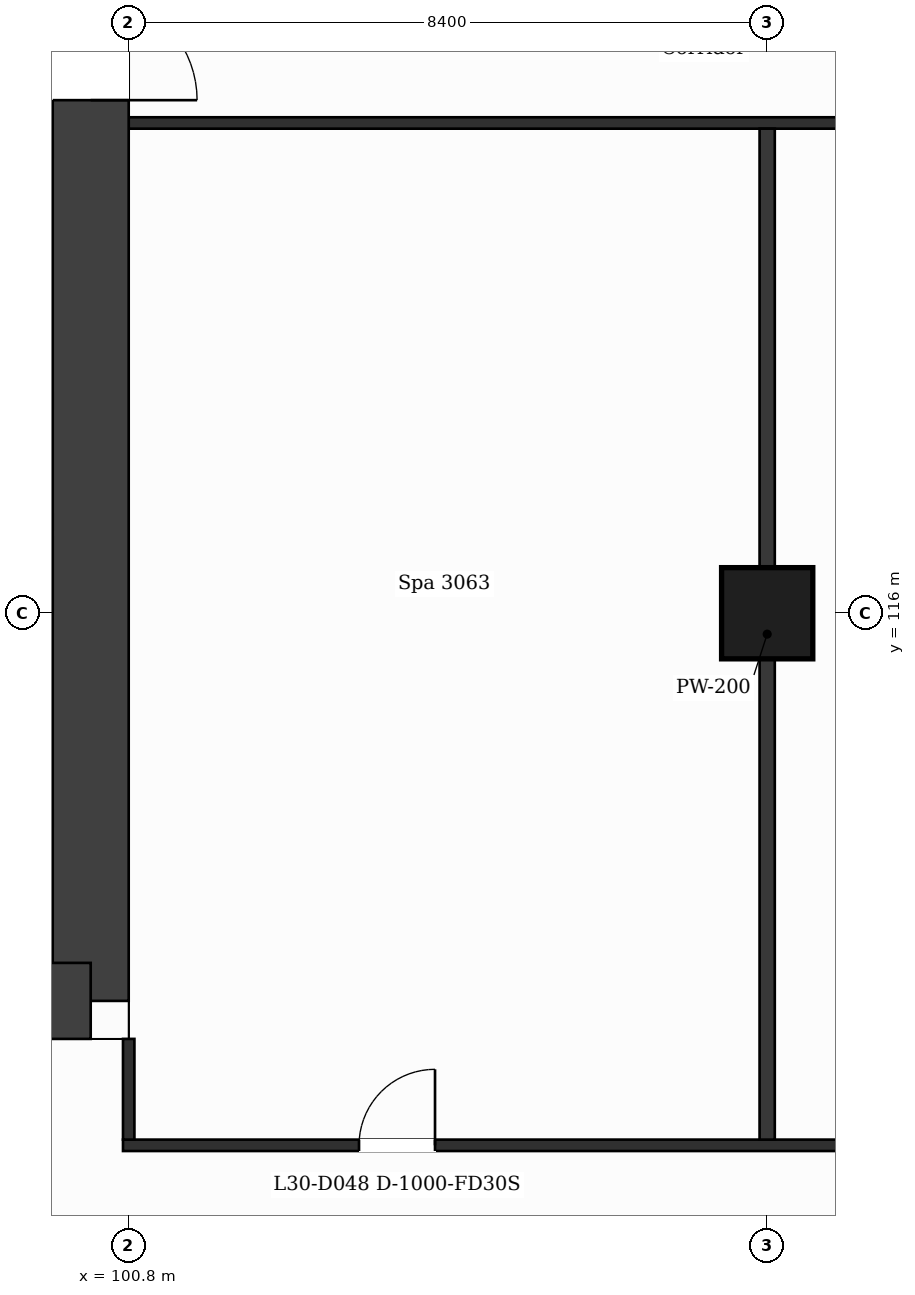
"""IFC4 building model, lengths in metres.
Left out: names, types, materials, properties, quantities, classifications, styles, units other than length and angle.
Written with IfcOpenShell. Run it as: python <this file> out.ifc"""

import sys

from ifc_helpers import new_model, si_unit, direction, frame, frame_2d, origin, origin_2d, place, context, subcontext, project, spatial, rectangle, extrude, element, fill, save


model = new_model("IFC4")
c1 = context("Model", 3, precision=1e-05, world=origin(), true_north=direction((0.0, 1.0)))
c2 = subcontext(c1, "Body", "Model", "MODEL_VIEW")
j1 = project(units=[si_unit("LENGTHUNIT", "METRE"), si_unit("PLANEANGLEUNIT", "RADIAN")], contexts=[c1])
p1 = place(None, origin())
s1 = spatial("IfcSite", under=j1, at=p1, CompositionType="ELEMENT")
p2 = place(p1, origin())
s2 = spatial("IfcBuilding", under=s1, at=p2, CompositionType="ELEMENT")
p3 = place(p2, frame((0.0, 0.0, 128.0)))
s3 = spatial("IfcBuildingStorey", under=s2, at=p3, CompositionType="ELEMENT", Elevation=128.0)
p4 = place(p3, frame((100.3, 131.9, 0.0), z_axis=(0.0, 0.0, 1.0), x_axis=(0.0, -1.0, 0.0)))
e1 = element("IfcWall", 1, at=p4, inside=s3, PredefinedType="SHEAR", context=c2, shape_type="SweptSolid", body=[
    extrude(rectangle(XDim=21.0, YDim=1.0, at=frame_2d((10.5, 0.0))), origin(), (0.0, 0.0, 1.0), 3.7),
])
p5 = place(p4, frame((7.75, 0.0, 0.0)))
e2 = element("IfcOpeningElement", 2, at=p5, cuts=e1, PredefinedType="OPENING", context=c2, shape_type="SweptSolid", body=[
    extrude(rectangle(XDim=1.4, YDim=2.1, at=frame_2d((0.7, 1.05))), frame((0.0, 0.51, 0.0), z_axis=(0.0, -1.0, 0.0), x_axis=(1.0, 0.0, 0.0)), (0.0, 0.0, 1.0), 1.02),
])
p6 = place(p3, frame((100.3, 110.9, 0.0), z_axis=(0.0, 0.0, 1.0), x_axis=(-1.0, 0.0, 0.0)))
e3 = element("IfcWall", 3, at=p6, inside=s3, PredefinedType="SHEAR", context=c2, shape_type="SweptSolid", body=[
    extrude(rectangle(XDim=14.059, YDim=1.0, at=frame_2d((7.03, 0.0))), origin(), (0.0, 0.0, 1.0), 3.7),
])
p7 = place(p6, frame((5.802, 0.0, 0.0)))
e4 = element("IfcOpeningElement", 4, at=p7, cuts=e3, PredefinedType="OPENING", context=c2, shape_type="SweptSolid", body=[
    extrude(rectangle(XDim=1.4, YDim=2.1, at=frame_2d((0.7, 1.05))), frame((0.0, 0.51, 0.0), z_axis=(0.0, -1.0, 0.0), x_axis=(1.0, 0.0, 0.0)), (0.0, 0.0, 1.0), 1.02),
])
p8 = place(p3, frame((94.9, 116.5, 0.0), z_axis=(0.0, 0.0, 1.0), x_axis=(1.0, 0.0, 0.0)))
e5 = element("IfcWall", 5, at=p8, inside=s3, PredefinedType="SHEAR", context=c2, shape_type="SweptSolid", body=[
    extrude(rectangle(XDim=4.9, YDim=1.0, at=frame_2d((2.45, 0.0))), origin(), (0.0, 0.0, 1.0), 3.7),
])
p9 = place(p3, frame((109.2, 116.0, 0.0), z_axis=(0.0, 0.0, 1.0), x_axis=(1.0, 0.0, 0.0)))
e6 = element("IfcColumn", 6, at=p9, inside=s3, PredefinedType="COLUMN", context=c2, shape_type="SweptSolid", body=[
    extrude(rectangle(XDim=1.2, YDim=1.2, at=origin_2d()), origin(), (0.0, 0.0, 1.0), 3.7),
])
p10 = place(p3, frame((100.725, 109.0, 0.0), z_axis=(0.0, 0.0, 1.0), x_axis=(1.0, 0.0, 0.0)))
e7 = element("IfcWall", 7, at=p10, inside=s3, PredefinedType="PARTITIONING", context=c2, shape_type="SweptSolid", body=[
    extrude(rectangle(XDim=25.35, YDim=0.15, at=frame_2d((12.675, 0.0))), origin(), (0.0, 0.0, 1.0), 3.38),
])
p11 = place(p10, frame((3.105, 0.0, 0.0)))
e8 = element("IfcOpeningElement", 8, at=p11, cuts=e7, PredefinedType="OPENING", context=c2, shape_type="SweptSolid", body=[
    extrude(rectangle(XDim=1.0, YDim=2.1, at=frame_2d((0.5, 1.05))), frame((0.0, 0.085, 0.0), z_axis=(0.0, -1.0, 0.0), x_axis=(1.0, 0.0, 0.0)), (0.0, 0.0, 1.0), 0.17),
])
p12 = place(p10, frame((13.85, 0.0, 0.0)))
e9 = element("IfcOpeningElement", 9, at=p12, cuts=e7, PredefinedType="OPENING", context=c2, shape_type="SweptSolid", body=[
    extrude(rectangle(XDim=1.0, YDim=2.1, at=frame_2d((0.5, 1.05))), frame((0.0, 0.085, 0.0), z_axis=(0.0, -1.0, 0.0), x_axis=(1.0, 0.0, 0.0)), (0.0, 0.0, 1.0), 0.17),
])
p13 = place(p10, frame((18.475, 0.0, 0.0)))
e10 = element("IfcOpeningElement", 10, at=p13, cuts=e7, PredefinedType="OPENING", context=c2, shape_type="SweptSolid", body=[
    extrude(rectangle(XDim=1.0, YDim=2.1, at=frame_2d((0.5, 1.05))), frame((0.0, 0.085, 0.0), z_axis=(0.0, -1.0, 0.0), x_axis=(1.0, 0.0, 0.0)), (0.0, 0.0, 1.0), 0.17),
])
p14 = place(p10, frame((22.925, 0.0, 0.0)))
e11 = element("IfcOpeningElement", 11, at=p14, cuts=e7, PredefinedType="OPENING", context=c2, shape_type="SweptSolid", body=[
    extrude(rectangle(XDim=1.0, YDim=2.1, at=frame_2d((0.5, 1.05))), frame((0.0, 0.085, 0.0), z_axis=(0.0, -1.0, 0.0), x_axis=(1.0, 0.0, 0.0)), (0.0, 0.0, 1.0), 0.17),
])
for number, where, z_axis, x_axis in (
    (12, (95.227, 117.2, 0.0), (0.0, 0.0, 1.0), (1.0, 0.0, 0.0)),
    (13, (95.227, 118.8, 0.0), (0.0, 0.0, 1.0), (1.0, 0.0, 0.0)),
):
    element("IfcWall", number, at=place(p3, frame(where, z_axis=z_axis, x_axis=x_axis)), inside=s3, PredefinedType="PARTITIONING", context=c2, shape_type="SweptSolid", body=[
        extrude(rectangle(XDim=4.573, YDim=0.2, at=frame_2d((2.287, 0.0))), origin(), (0.0, 0.0, 1.0), 3.38),
    ])
p15 = place(p3, frame((95.227, 122.1, 0.0), z_axis=(0.0, 0.0, 1.0), x_axis=(1.0, 0.0, 0.0)))
e14 = element("IfcWall", 14, at=p15, inside=s3, PredefinedType="PARTITIONING", context=c2, shape_type="SweptSolid", body=[
    extrude(rectangle(XDim=4.573, YDim=0.2, at=frame_2d((2.287, 0.0))), origin(), (0.0, 0.0, 1.0), 3.38),
])
p16 = place(p15, frame((0.865, 0.0, 0.0)))
e15 = element("IfcOpeningElement", 15, at=p16, cuts=e14, PredefinedType="OPENING", context=c2, shape_type="SweptSolid", body=[
    extrude(rectangle(XDim=0.9, YDim=2.1, at=frame_2d((0.45, 1.05))), frame((0.0, 0.11, 0.0), z_axis=(0.0, -1.0, 0.0), x_axis=(1.0, 0.0, 0.0)), (0.0, 0.0, 1.0), 0.22),
])
p17 = place(p15, frame((2.911, 0.0, 0.0)))
e16 = element("IfcOpeningElement", 16, at=p17, cuts=e14, PredefinedType="OPENING", context=c2, shape_type="SweptSolid", body=[
    extrude(rectangle(XDim=0.9, YDim=2.1, at=frame_2d((0.45, 1.05))), frame((0.0, 0.11, 0.0), z_axis=(0.0, -1.0, 0.0), x_axis=(1.0, 0.0, 0.0)), (0.0, 0.0, 1.0), 0.22),
])
p18 = place(p3, frame((100.8, 122.45, 0.0), z_axis=(0.0, 0.0, 1.0), x_axis=(1.0, 0.0, 0.0)))
e17 = element("IfcWall", 17, at=p18, inside=s3, PredefinedType="PARTITIONING", context=c2, shape_type="SweptSolid", body=[
    extrude(rectangle(XDim=25.2, YDim=0.15, at=frame_2d((12.6, 0.0))), origin(), (0.0, 0.0, 1.0), 3.38),
])
p19 = place(p3, frame((100.8, 109.075, 0.0), z_axis=(0.0, 0.0, 1.0), x_axis=(0.0, 1.0, 0.0)))
e18 = element("IfcWall", 18, at=p19, inside=s3, PredefinedType="PARTITIONING", context=c2, shape_type="SweptSolid", body=[
    extrude(rectangle(XDim=1.325, YDim=0.15, at=frame_2d((0.663, 0.0))), origin(), (0.0, 0.0, 1.0), 3.38),
])
p20 = place(p3, frame((109.2, 109.075, 0.0), z_axis=(0.0, 0.0, 1.0), x_axis=(0.0, 1.0, 0.0)))
e19 = element("IfcWall", 19, at=p20, inside=s3, PredefinedType="PARTITIONING", context=c2, shape_type="SweptSolid", body=[
    extrude(rectangle(XDim=13.3, YDim=0.2, at=frame_2d((6.65, 0.0))), origin(), (0.0, 0.0, 1.0), 3.38),
])
p21 = place(p11, origin())
e20 = element("IfcDoor", 20, at=p21, inside=s3, OperationType="SINGLE_SWING_RIGHT", PredefinedType="DOOR", context=c2, shape_type="SweptSolid", body=[
    extrude(rectangle(XDim=1.0, YDim=2.1, at=frame_2d((0.5, 1.05))), frame((0.0, 0.025, 0.0), z_axis=(0.0, -1.0, 0.0), x_axis=(1.0, 0.0, 0.0)), (0.0, 0.0, 1.0), 0.05),
])
fill(e8, e20)
p22 = place(p5, origin())
e21 = element("IfcDoor", 21, at=p22, inside=s3, OperationType="SINGLE_SWING_RIGHT", PredefinedType="DOOR", context=c2, shape_type="SweptSolid", body=[
    extrude(rectangle(XDim=1.4, YDim=2.1, at=frame_2d((0.7, 1.05))), frame((0.0, 0.025, 0.0), z_axis=(0.0, -1.0, 0.0), x_axis=(1.0, 0.0, 0.0)), (0.0, 0.0, 1.0), 0.05),
])
fill(e2, e21)
save(model, sys.argv[1])
